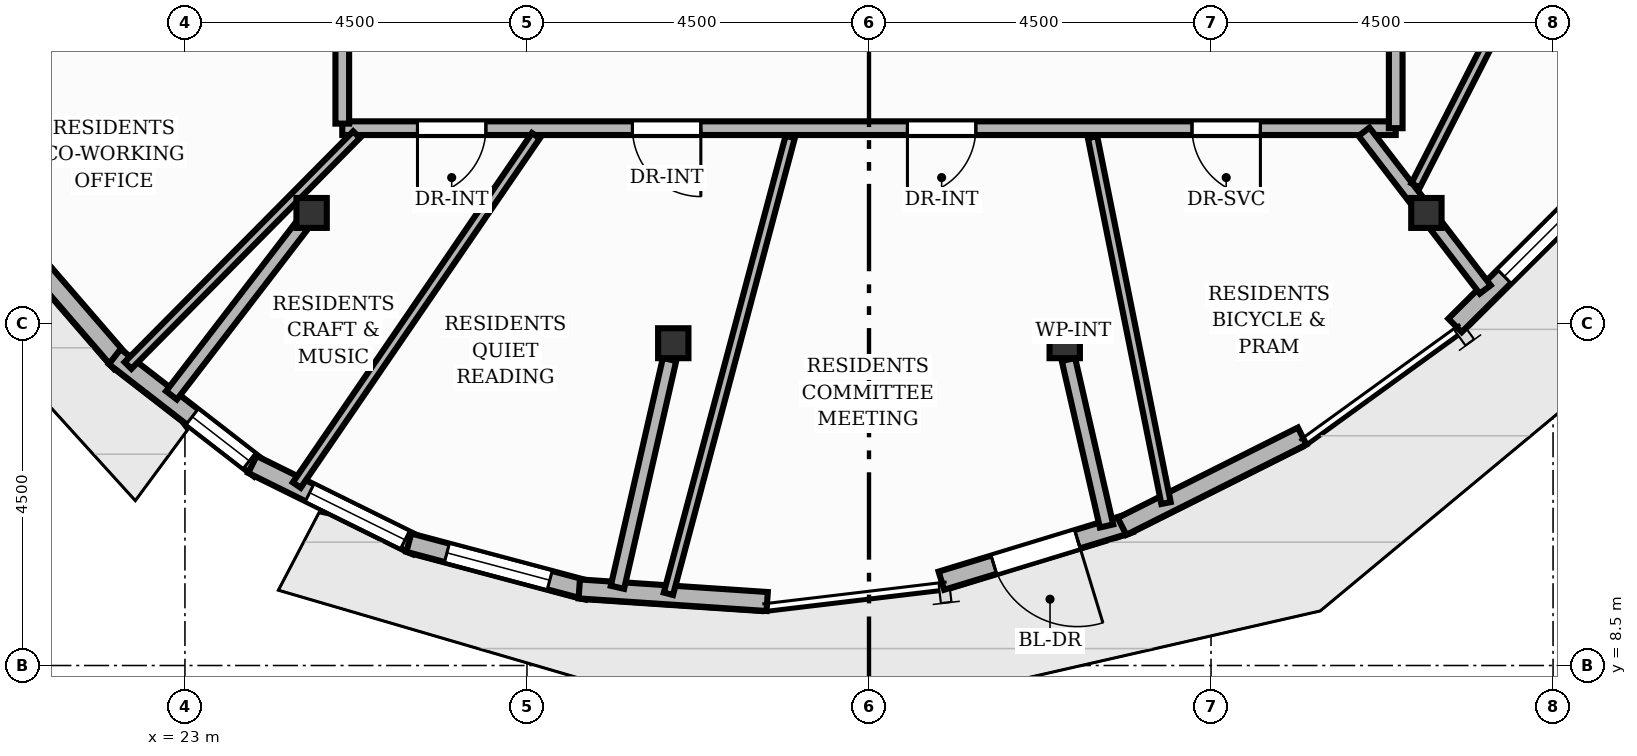
"""IFC4 building model, lengths in metres.
Left out: names, types, materials, properties, quantities, classifications, styles, units other than length and angle.
Written with IfcOpenShell. Run it as: python <this file> out.ifc"""

import sys

from ifc_helpers import new_model, si_unit, direction, frame, frame_2d, origin, origin_2d, place, context, subcontext, project, spatial, rectangle, i_section, extrude, element, fill, save


model = new_model("IFC4")
c1 = context("Model", 3, precision=1e-05, world=origin(), true_north=direction((0.0, 1.0)))
c2 = subcontext(c1, "Body", "Model", "MODEL_VIEW")
j1 = project(units=[si_unit("LENGTHUNIT", "METRE"), si_unit("PLANEANGLEUNIT", "RADIAN")], contexts=[c1])
p1 = place(None, origin())
s1 = spatial("IfcSite", under=j1, at=p1, CompositionType="ELEMENT")
p2 = place(p1, origin())
s2 = spatial("IfcBuilding", under=s1, at=p2, CompositionType="ELEMENT")
p3 = place(p2, frame((0.0, 0.0, 233.44)))
s3 = spatial("IfcBuildingStorey", under=s2, at=p3, CompositionType="ELEMENT", Elevation=233.44)
for number, where, z_axis, x_axis in (
    (1, (24.667, 14.455, 0.0), (0.0, 0.0, 1.0), (1.0, 0.0, 0.0)),
    (2, (29.425, 12.74, 0.0), (0.0, 0.0, 1.0), (1.0, 0.0, 0.0)),
    (3, (34.575, 12.74, 0.0), (0.0, 0.0, 1.0), (1.0, 0.0, 0.0)),
    (4, (39.333, 14.455, 0.0), (0.0, 0.0, 1.0), (1.0, 0.0, 0.0)),
):
    element("IfcColumn", number, at=place(p3, frame(where, z_axis=z_axis, x_axis=x_axis)), inside=s3, PredefinedType="COLUMN", context=c2, shape_type="SweptSolid", body=[
        extrude(i_section(OverallWidth=0.399, OverallDepth=0.394, WebThickness=0.023, FlangeThickness=0.037, at=origin_2d()), origin(), (0.0, 0.0, 1.0), 3.2),
    ])
p4 = place(p3, frame((22.159, 12.486, 0.0), z_axis=(0.0, 0.0, 1.0), x_axis=(-0.653838956375, 0.756633741732, 0.0)))
e5 = element("IfcWall", 5, at=p4, inside=s3, PredefinedType="SOLIDWALL", context=c2, shape_type="SweptSolid", body=[
    extrude(rectangle(XDim=2.437, YDim=0.25, at=frame_2d((1.218, 0.0))), origin(), (0.0, 0.0, 1.0), 2.96),
])
p5 = place(p3, frame((23.985, 11.085, 0.0), z_axis=(0.0, 0.0, 1.0), x_axis=(-0.790325704793, 0.612686935019, 0.0)))
e6 = element("IfcWall", 6, at=p5, inside=s3, PredefinedType="SOLIDWALL", context=c2, shape_type="SweptSolid", body=[
    extrude(rectangle(XDim=2.415, YDim=0.25, at=frame_2d((1.208, 0.0))), origin(), (0.0, 0.0, 1.0), 2.96),
])
p6 = place(p5, frame((0.175, 0.0, 0.85)))
e7 = element("IfcOpeningElement", 7, at=p6, cuts=e6, PredefinedType="OPENING", context=c2, shape_type="SweptSolid", body=[
    extrude(rectangle(XDim=0.95, YDim=1.45, at=frame_2d((0.475, 0.725))), frame((0.0, 0.135, 0.0), z_axis=(0.0, -1.0, 0.0), x_axis=(1.0, 0.0, 0.0)), (0.0, 0.0, 1.0), 0.27),
])
p7 = place(p3, frame((26.052, 10.076, 0.0), z_axis=(0.0, 0.0, 1.0), x_axis=(-0.896540415167, 0.442961944158, 0.0)))
e8 = element("IfcWall", 8, at=p7, inside=s3, PredefinedType="SOLIDWALL", context=c2, shape_type="SweptSolid", body=[
    extrude(rectangle(XDim=2.415, YDim=0.25, at=frame_2d((1.207, 0.0))), origin(), (0.0, 0.0, 1.0), 2.96),
])
p8 = place(p7, frame((0.175, 0.0, 0.85)))
e9 = element("IfcOpeningElement", 9, at=p8, cuts=e8, PredefinedType="OPENING", context=c2, shape_type="SweptSolid", body=[
    extrude(rectangle(XDim=1.4, YDim=1.55, at=frame_2d((0.7, 0.775))), frame((0.0, 0.135, 0.0), z_axis=(0.0, -1.0, 0.0), x_axis=(1.0, 0.0, 0.0)), (0.0, 0.0, 1.0), 0.27),
])
p9 = place(p3, frame((28.3, 9.489, 0.0), z_axis=(0.0, 0.0, 1.0), x_axis=(-0.96631636381, 0.257357115761, 0.0)))
e10 = element("IfcWall", 10, at=p9, inside=s3, PredefinedType="SOLIDWALL", context=c2, shape_type="SweptSolid", body=[
    extrude(rectangle(XDim=2.437, YDim=0.25, at=frame_2d((1.219, 0.0))), origin(), (0.0, 0.0, 1.0), 2.96),
])
p10 = place(p9, frame((0.518, 0.0, 0.85)))
e11 = element("IfcOpeningElement", 11, at=p10, cuts=e10, PredefinedType="OPENING", context=c2, shape_type="SweptSolid", body=[
    extrude(rectangle(XDim=1.4, YDim=1.55, at=frame_2d((0.7, 0.775))), frame((0.0, 0.135, 0.0), z_axis=(0.0, -1.0, 0.0), x_axis=(1.0, 0.0, 0.0)), (0.0, 0.0, 1.0), 0.27),
])
p11 = place(p3, frame((30.66, 9.342, 0.0), z_axis=(0.0, 0.0, 1.0), x_axis=(-0.997759800667, 0.06689828228, 0.0)))
e12 = element("IfcWall", 12, at=p11, inside=s3, PredefinedType="SOLIDWALL", context=c2, shape_type="SweptSolid", body=[
    extrude(rectangle(XDim=2.478, YDim=0.25, at=frame_2d((1.239, 0.0))), origin(), (0.0, 0.0, 1.0), 2.96),
])
p12 = place(p3, frame((35.432, 10.372, 0.0), z_axis=(0.0, 0.0, 1.0), x_axis=(-0.956515193001, -0.291682508145, 0.0)))
e13 = element("IfcWall", 13, at=p12, inside=s3, PredefinedType="SOLIDWALL", context=c2, shape_type="SweptSolid", body=[
    extrude(rectangle(XDim=2.592, YDim=0.25, at=frame_2d((1.296, 0.0))), origin(), (0.0, 0.0, 1.0), 2.96),
])
p13 = place(p12, frame((0.721, 0.0, 0.0)))
e14 = element("IfcOpeningElement", 14, at=p13, cuts=e13, PredefinedType="OPENING", context=c2, shape_type="SweptSolid", body=[
    extrude(rectangle(XDim=1.15, YDim=2.2, at=frame_2d((0.575, 1.1))), frame((0.0, 0.135, 0.0), z_axis=(0.0, -1.0, 0.0), x_axis=(1.0, 0.0, 0.0)), (0.0, 0.0, 1.0), 0.27),
])
p14 = place(p3, frame((37.699, 11.519, 0.0), z_axis=(0.0, 0.0, 1.0), x_axis=(-0.893929345503, -0.448207904045, 0.0)))
e15 = element("IfcWall", 15, at=p14, inside=s3, PredefinedType="SOLIDWALL", context=c2, shape_type="SweptSolid", body=[
    extrude(rectangle(XDim=2.651, YDim=0.25, at=frame_2d((1.326, 0.0))), origin(), (0.0, 0.0, 1.0), 2.96),
])
p15 = place(p3, frame((41.652, 14.906, 0.0), z_axis=(0.0, 0.0, 1.0), x_axis=(-0.709065267838, -0.705142854991, 0.0)))
e16 = element("IfcWall", 16, at=p15, inside=s3, PredefinedType="SOLIDWALL", context=c2, shape_type="SweptSolid", body=[
    extrude(rectangle(XDim=2.739, YDim=0.25, at=frame_2d((1.369, 0.0))), origin(), (0.0, 0.0, 1.0), 2.96),
])
p16 = place(p15, frame((0.175, 0.0, 0.85)))
e17 = element("IfcOpeningElement", 17, at=p16, cuts=e16, PredefinedType="OPENING", context=c2, shape_type="SweptSolid", body=[
    extrude(rectangle(XDim=1.65, YDim=1.52, at=frame_2d((0.825, 0.76))), frame((0.0, 0.135, 0.0), z_axis=(0.0, -1.0, 0.0), x_axis=(1.0, 0.0, 0.0)), (0.0, 0.0, 1.0), 0.27),
])
p17 = place(p3, frame((24.533, 14.281, 0.0), z_axis=(0.0, 0.0, 1.0), x_axis=(-0.609243973043, -0.792982837967, 0.0)))
e18 = element("IfcWall", 18, at=p17, inside=s3, PredefinedType="PARTITIONING", context=c2, shape_type="SweptSolid", body=[
    extrude(rectangle(XDim=2.806, YDim=0.18, at=frame_2d((1.403, 0.0))), origin(), (0.0, 0.0, 1.0), 2.404),
])
p18 = place(p3, frame((29.376, 12.527, 0.0), z_axis=(0.0, 0.0, 1.0), x_axis=(-0.223020975075, -0.974813646128, 0.0)))
e19 = element("IfcWall", 19, at=p18, inside=s3, PredefinedType="PARTITIONING", context=c2, shape_type="SweptSolid", body=[
    extrude(rectangle(XDim=3.075, YDim=0.18, at=frame_2d((1.538, 0.0))), origin(), (0.0, 0.0, 1.0), 2.404),
])
p19 = place(p3, frame((34.624, 12.527, 0.0), z_axis=(0.0, 0.0, 1.0), x_axis=(0.223034234637, -0.974810612468, 0.0)))
e20 = element("IfcWall", 20, at=p19, inside=s3, PredefinedType="PARTITIONING", context=c2, shape_type="SweptSolid", body=[
    extrude(rectangle(XDim=2.247, YDim=0.18, at=frame_2d((1.124, 0.0))), origin(), (0.0, 0.0, 1.0), 2.404),
])
p20 = place(p3, frame((39.467, 14.281, 0.0), z_axis=(0.0, 0.0, 1.0), x_axis=(0.609328843401, -0.792917625356, 0.0)))
e21 = element("IfcWall", 21, at=p20, inside=s3, PredefinedType="PARTITIONING", context=c2, shape_type="SweptSolid", body=[
    extrude(rectangle(XDim=1.051, YDim=0.18, at=frame_2d((0.525, 0.0))), origin(), (0.0, 0.0, 1.0), 2.404),
])
p21 = place(p3, frame((38.93, 15.57, 0.0), z_axis=(0.0, 0.0, 1.0), x_axis=(-1.0, 0.0, 0.0)))
e22 = element("IfcWall", 22, at=p21, inside=s3, PredefinedType="PARTITIONING", context=c2, shape_type="SweptSolid", body=[
    extrude(rectangle(XDim=13.86, YDim=0.18, at=frame_2d((6.93, 0.0))), origin(), (0.0, 0.0, 1.0), 2.955),
])
p22 = place(p21, frame((1.781, 0.0, 0.0)))
e23 = element("IfcOpeningElement", 23, at=p22, cuts=e22, PredefinedType="OPENING", context=c2, shape_type="SweptSolid", body=[
    extrude(rectangle(XDim=0.9, YDim=2.1, at=frame_2d((0.45, 1.05))), frame((0.0, 0.1, 0.0), z_axis=(0.0, -1.0, 0.0), x_axis=(1.0, 0.0, 0.0)), (0.0, 0.0, 1.0), 0.2),
])
p23 = place(p21, frame((5.524, 0.0, 0.0)))
e24 = element("IfcOpeningElement", 24, at=p23, cuts=e22, PredefinedType="OPENING", context=c2, shape_type="SweptSolid", body=[
    extrude(rectangle(XDim=0.9, YDim=2.1, at=frame_2d((0.45, 1.05))), frame((0.0, 0.1, 0.0), z_axis=(0.0, -1.0, 0.0), x_axis=(1.0, 0.0, 0.0)), (0.0, 0.0, 1.0), 0.2),
])
p24 = place(p21, frame((9.143, 0.0, 0.0)))
e25 = element("IfcOpeningElement", 25, at=p24, cuts=e22, PredefinedType="OPENING", context=c2, shape_type="SweptSolid", body=[
    extrude(rectangle(XDim=0.9, YDim=2.1, at=frame_2d((0.45, 1.05))), frame((0.0, 0.1, 0.0), z_axis=(0.0, -1.0, 0.0), x_axis=(1.0, 0.0, 0.0)), (0.0, 0.0, 1.0), 0.2),
])
p25 = place(p21, frame((11.97, 0.0, 0.0)))
e26 = element("IfcOpeningElement", 26, at=p25, cuts=e22, PredefinedType="OPENING", context=c2, shape_type="SweptSolid", body=[
    extrude(rectangle(XDim=0.9, YDim=2.1, at=frame_2d((0.45, 1.05))), frame((0.0, 0.1, 0.0), z_axis=(0.0, -1.0, 0.0), x_axis=(1.0, 0.0, 0.0)), (0.0, 0.0, 1.0), 0.2),
])
p26 = place(p3, frame((25.07, 15.63, 0.0), z_axis=(0.0, 0.0, 1.0), x_axis=(0.0, 1.0, 0.0)))
e27 = element("IfcWall", 27, at=p26, inside=s3, PredefinedType="PARTITIONING", context=c2, shape_type="SweptSolid", body=[
    extrude(rectangle(XDim=5.909, YDim=0.18, at=frame_2d((2.954, 0.0))), origin(), (0.0, 0.0, 1.0), 2.955),
])
p27 = place(p26, frame((1.731, 0.0, 0.0)))
e28 = element("IfcOpeningElement", 28, at=p27, cuts=e27, PredefinedType="OPENING", context=c2, shape_type="SweptSolid", body=[
    extrude(rectangle(XDim=0.9, YDim=2.1, at=frame_2d((0.45, 1.05))), frame((0.0, 0.1, 0.0), z_axis=(0.0, -1.0, 0.0), x_axis=(1.0, 0.0, 0.0)), (0.0, 0.0, 1.0), 0.2),
])
p28 = place(p3, frame((38.93, 32.43, 0.0), z_axis=(0.0, 0.0, 1.0), x_axis=(0.0, -1.0, 0.0)))
e29 = element("IfcWall", 29, at=p28, inside=s3, PredefinedType="PARTITIONING", context=c2, shape_type="SweptSolid", body=[
    extrude(rectangle(XDim=16.86, YDim=0.18, at=frame_2d((8.43, 0.0))), origin(), (0.0, 0.0, 1.0), 2.955),
])
p29 = place(p28, frame((7.632, 0.0, 0.0)))
e30 = element("IfcOpeningElement", 30, at=p29, cuts=e29, PredefinedType="OPENING", context=c2, shape_type="SweptSolid", body=[
    extrude(rectangle(XDim=1.05, YDim=2.15, at=frame_2d((0.525, 1.075))), frame((0.0, 0.1, 0.0), z_axis=(0.0, -1.0, 0.0), x_axis=(1.0, 0.0, 0.0)), (0.0, 0.0, 1.0), 0.2),
])
p30 = place(p3, frame((35.908, 10.638, 0.0), z_axis=(0.0, 0.0, 1.0), x_axis=(-0.196928748325, 0.980417802818, 0.0)))
e31 = element("IfcWall", 31, at=p30, inside=s3, PredefinedType="PARTITIONING", context=c2, shape_type="SweptSolid", body=[
    extrude(rectangle(XDim=4.911, YDim=0.125, at=frame_2d((2.455, 0.0))), origin(), (0.0, 0.0, 1.0), 2.955),
])
p31 = place(p3, frame((38.513, 15.522, 0.0), z_axis=(0.0, 0.0, 1.0), x_axis=(0.609249951785, -0.7929782445, 0.0)))
e32 = element("IfcWall", 32, at=p31, inside=s3, PredefinedType="PARTITIONING", context=c2, shape_type="SweptSolid", body=[
    extrude(rectangle(XDim=1.127, YDim=0.18, at=frame_2d((0.563, 0.0))), origin(), (0.0, 0.0, 1.0), 2.404),
])
p32 = place(p3, frame((29.361, 9.444, 0.0), z_axis=(0.0, 0.0, 1.0), x_axis=(0.257643106476, 0.966240151145, 0.0)))
e33 = element("IfcWall", 33, at=p32, inside=s3, PredefinedType="PARTITIONING", context=c2, shape_type="SweptSolid", body=[
    extrude(rectangle(XDim=6.22, YDim=0.125, at=frame_2d((3.11, 0.0))), origin(), (0.0, 0.0, 1.0), 2.955),
])
p33 = place(p3, frame((24.471, 10.874, 0.0), z_axis=(0.0, 0.0, 1.0), x_axis=(0.564753044296, 0.825259958412, 0.0)))
e34 = element("IfcWall", 34, at=p33, inside=s3, PredefinedType="PARTITIONING", context=c2, shape_type="SweptSolid", body=[
    extrude(rectangle(XDim=5.571, YDim=0.125, at=frame_2d((2.785, 0.0))), origin(), (0.0, 0.0, 1.0), 2.692),
])
p34 = place(p3, frame((22.251, 12.448, 0.0), z_axis=(0.0, 0.0, 1.0), x_axis=(0.7036132626, 0.710583124408, 0.0)))
e35 = element("IfcWall", 35, at=p34, inside=s3, PredefinedType="PARTITIONING", context=c2, shape_type="SweptSolid", body=[
    extrude(rectangle(XDim=4.273, YDim=0.125, at=frame_2d((2.137, 0.0))), origin(), (0.0, 0.0, 1.0), 2.404),
])
p35 = place(p3, frame((43.214, 22.689, 0.0), z_axis=(0.0, 0.0, 1.0), x_axis=(-0.45492955231, -0.890527429356, 0.0)))
e36 = element("IfcWall", 36, at=p35, inside=s3, PredefinedType="PARTITIONING", context=c2, shape_type="SweptSolid", body=[
    extrude(rectangle(XDim=8.84, YDim=0.125, at=frame_2d((4.42, 0.0))), origin(), (0.0, 0.0, 1.0), 2.955),
])
p36 = place(p35, frame((3.97, 0.0, 0.0)))
e37 = element("IfcOpeningElement", 37, at=p36, cuts=e36, PredefinedType="OPENING", context=c2, shape_type="SweptSolid", body=[
    extrude(rectangle(XDim=0.9, YDim=2.1, at=frame_2d((0.45, 1.05))), frame((0.0, 0.073, 0.0), z_axis=(0.0, -1.0, 0.0), x_axis=(1.0, 0.0, 0.0)), (0.0, 0.0, 1.0), 0.145),
])
p37 = place(p13, origin())
e38 = element("IfcDoor", 38, at=p37, inside=s3, OperationType="SINGLE_SWING_LEFT", PredefinedType="DOOR", context=c2, shape_type="SweptSolid", body=[
    extrude(rectangle(XDim=1.15, YDim=2.2, at=frame_2d((0.575, 1.1))), frame((0.0, 0.025, 0.0), z_axis=(0.0, -1.0, 0.0), x_axis=(1.0, 0.0, 0.0)), (0.0, 0.0, 1.0), 0.05),
])
fill(e14, e38)
p38 = place(p6, origin())
e39 = element("IfcWindow", 39, at=p38, inside=s3, PartitioningType="SINGLE_PANEL", PredefinedType="WINDOW", context=c2, shape_type="SweptSolid", body=[
    extrude(rectangle(XDim=0.95, YDim=1.45, at=frame_2d((0.475, 0.725))), frame((0.0, 0.03, 0.0), z_axis=(0.0, -1.0, 0.0), x_axis=(1.0, 0.0, 0.0)), (0.0, 0.0, 1.0), 0.06),
])
fill(e7, e39)
p39 = place(p8, origin())
e40 = element("IfcWindow", 40, at=p39, inside=s3, PartitioningType="SINGLE_PANEL", PredefinedType="WINDOW", context=c2, shape_type="SweptSolid", body=[
    extrude(rectangle(XDim=1.4, YDim=1.55, at=frame_2d((0.7, 0.775))), frame((0.0, 0.03, 0.0), z_axis=(0.0, -1.0, 0.0), x_axis=(1.0, 0.0, 0.0)), (0.0, 0.0, 1.0), 0.06),
])
fill(e9, e40)
p40 = place(p10, origin())
e41 = element("IfcWindow", 41, at=p40, inside=s3, PartitioningType="SINGLE_PANEL", PredefinedType="WINDOW", context=c2, shape_type="SweptSolid", body=[
    extrude(rectangle(XDim=1.4, YDim=1.55, at=frame_2d((0.7, 0.775))), frame((0.0, 0.03, 0.0), z_axis=(0.0, -1.0, 0.0), x_axis=(1.0, 0.0, 0.0)), (0.0, 0.0, 1.0), 0.06),
])
fill(e11, e41)
p41 = place(p16, origin())
e42 = element("IfcWindow", 42, at=p41, inside=s3, PartitioningType="SINGLE_PANEL", PredefinedType="WINDOW", context=c2, shape_type="SweptSolid", body=[
    extrude(rectangle(XDim=1.65, YDim=1.52, at=frame_2d((0.825, 0.76))), frame((0.0, 0.03, 0.0), z_axis=(0.0, -1.0, 0.0), x_axis=(1.0, 0.0, 0.0)), (0.0, 0.0, 1.0), 0.06),
])
fill(e17, e42)
p42 = place(p22, origin())
e43 = element("IfcDoor", 43, at=p42, inside=s3, OperationType="SINGLE_SWING_LEFT", PredefinedType="DOOR", context=c2, shape_type="SweptSolid", body=[
    extrude(rectangle(XDim=0.9, YDim=2.1, at=frame_2d((0.45, 1.05))), frame((0.0, 0.025, 0.0), z_axis=(0.0, -1.0, 0.0), x_axis=(1.0, 0.0, 0.0)), (0.0, 0.0, 1.0), 0.05),
])
fill(e23, e43)
p43 = place(p23, origin())
e44 = element("IfcDoor", 44, at=p43, inside=s3, OperationType="SINGLE_SWING_RIGHT", PredefinedType="DOOR", context=c2, shape_type="SweptSolid", body=[
    extrude(rectangle(XDim=0.9, YDim=2.1, at=frame_2d((0.45, 1.05))), frame((0.0, 0.025, 0.0), z_axis=(0.0, -1.0, 0.0), x_axis=(1.0, 0.0, 0.0)), (0.0, 0.0, 1.0), 0.05),
])
fill(e24, e44)
p44 = place(p24, origin())
e45 = element("IfcDoor", 45, at=p44, inside=s3, OperationType="SINGLE_SWING_LEFT", PredefinedType="DOOR", context=c2, shape_type="SweptSolid", body=[
    extrude(rectangle(XDim=0.9, YDim=2.1, at=frame_2d((0.45, 1.05))), frame((0.0, 0.025, 0.0), z_axis=(0.0, -1.0, 0.0), x_axis=(1.0, 0.0, 0.0)), (0.0, 0.0, 1.0), 0.05),
])
fill(e25, e45)
p45 = place(p25, origin())
e46 = element("IfcDoor", 46, at=p45, inside=s3, OperationType="SINGLE_SWING_RIGHT", PredefinedType="DOOR", context=c2, shape_type="SweptSolid", body=[
    extrude(rectangle(XDim=0.9, YDim=2.1, at=frame_2d((0.45, 1.05))), frame((0.0, 0.025, 0.0), z_axis=(0.0, -1.0, 0.0), x_axis=(1.0, 0.0, 0.0)), (0.0, 0.0, 1.0), 0.05),
])
fill(e26, e46)
save(model, sys.argv[1])
